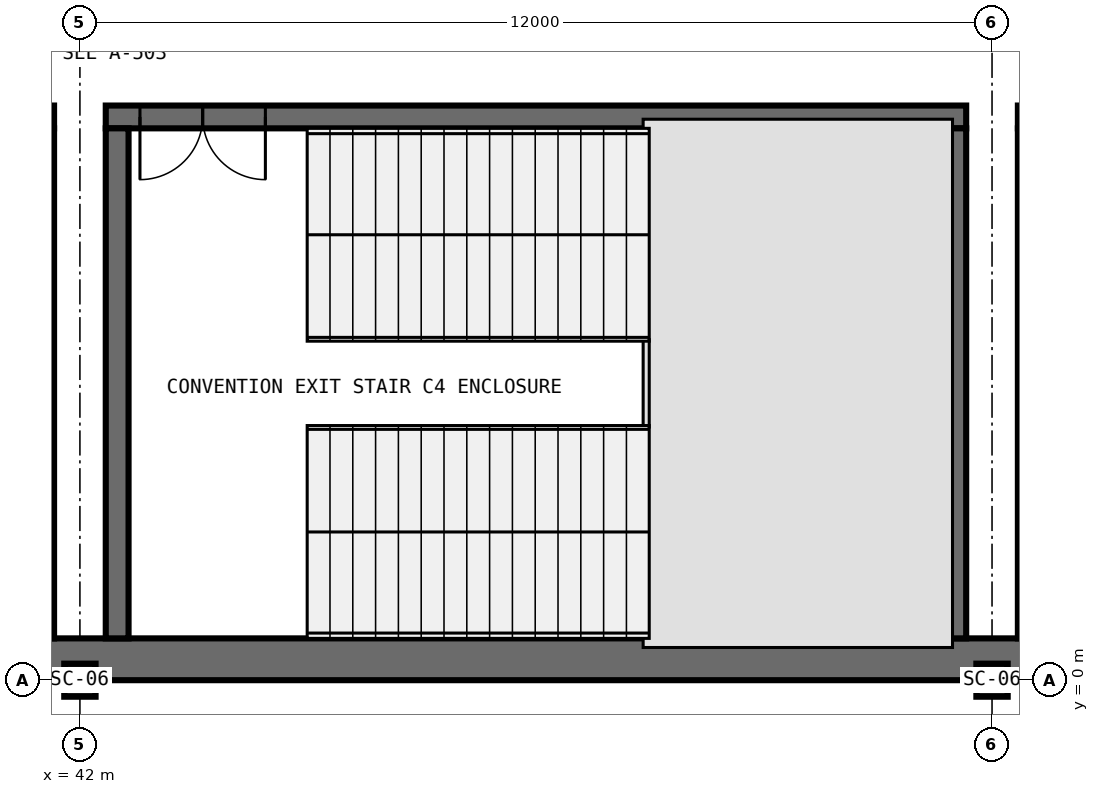
"""IFC4 building model, lengths in metres.
Left out: names, types, materials, properties, quantities, classifications, styles, units other than length and angle.
Written with IfcOpenShell. Run it as: python <this file> out.ifc"""

import sys

from ifc_helpers import new_model, si_unit, direction, frame, frame_2d, origin, origin_2d, place, context, subcontext, project, spatial, rectangle, i_section, extrude, element, fill, save


model = new_model("IFC4")
c1 = context("Model", 3, precision=1e-05, world=origin(), true_north=direction((0.0, 1.0)))
c2 = subcontext(c1, "Body", "Model", "MODEL_VIEW")
j1 = project(units=[si_unit("LENGTHUNIT", "METRE"), si_unit("PLANEANGLEUNIT", "RADIAN")], contexts=[c1])
p1 = place(None, origin())
s1 = spatial("IfcSite", under=j1, at=p1, CompositionType="ELEMENT")
p2 = place(p1, origin())
s2 = spatial("IfcBuilding", under=s1, at=p2, CompositionType="ELEMENT")
p3 = place(p2, frame((0.0, 0.0, -5.4)))
s3 = spatial("IfcBuildingStorey", under=s2, at=p3, CompositionType="ELEMENT", Elevation=-5.4)
for number, where, z_axis, x_axis in (
    (1, (42.0, 0.0, 0.0), (0.0, 0.0, 1.0), (1.0, 0.0, 0.0)),
    (2, (54.0, 0.0, 0.0), (0.0, 0.0, 1.0), (1.0, 0.0, 0.0)),
):
    element("IfcColumn", number, at=place(p3, frame(where, z_axis=z_axis, x_axis=x_axis)), inside=s3, PredefinedType="COLUMN", context=c2, shape_type="SweptSolid", body=[
        extrude(i_section(OverallWidth=0.412, OverallDepth=0.435, WebThickness=0.036, FlangeThickness=0.057, FilletRadius=0.031, at=origin_2d()), origin(), (0.0, 0.0, 1.0), 5.4),
    ])
p4 = place(p3, frame((0.0, 0.275, 0.0), z_axis=(0.0, 0.0, 1.0), x_axis=(1.0, 0.0, 0.0)))
e3 = element("IfcWall", 3, at=p4, inside=s3, PredefinedType="SOLIDWALL", context=c2, shape_type="SweptSolid", body=[
    extrude(rectangle(XDim=174.0, YDim=0.55, at=frame_2d((87.0, 0.0))), origin(), (0.0, 0.0, 1.0), 5.02),
])
p5 = place(p3, frame((41.66, 7.41, 0.0), z_axis=(0.0, 0.0, 1.0), x_axis=(-1.0, 0.0, 0.0)))
e4 = element("IfcWall", 4, at=p5, inside=s3, PredefinedType="SHEAR", context=c2, shape_type="SweptSolid", body=[
    extrude(rectangle(XDim=11.32, YDim=0.3, at=frame_2d((5.66, 0.0))), origin(), (0.0, 0.0, 1.0), 5.4),
])
p6 = place(p5, frame((9.22, 0.0, 0.0)))
e5 = element("IfcOpeningElement", 5, at=p6, cuts=e4, PredefinedType="OPENING", context=c2, shape_type="SweptSolid", body=[
    extrude(rectangle(XDim=1.65, YDim=2.25, at=frame_2d((0.825, 1.125))), frame((0.0, 0.165, 0.0), z_axis=(0.0, -1.0, 0.0), x_axis=(1.0, 0.0, 0.0)), (0.0, 0.0, 1.0), 0.33),
])
p7 = place(p3, frame((41.51, 0.55, 0.0), z_axis=(0.0, 0.0, 1.0), x_axis=(0.0, 1.0, 0.0)))
e6 = element("IfcWall", 6, at=p7, inside=s3, PredefinedType="SHEAR", context=c2, shape_type="SweptSolid", body=[
    extrude(rectangle(XDim=6.71, YDim=0.3, at=frame_2d((3.355, 0.0))), origin(), (0.0, 0.0, 1.0), 5.4),
])
p8 = place(p3, frame((53.66, 7.41, 0.0), z_axis=(0.0, 0.0, 1.0), x_axis=(-1.0, 0.0, 0.0)))
e7 = element("IfcWall", 7, at=p8, inside=s3, PredefinedType="SHEAR", context=c2, shape_type="SweptSolid", body=[
    extrude(rectangle(XDim=11.32, YDim=0.3, at=frame_2d((5.66, 0.0))), origin(), (0.0, 0.0, 1.0), 5.4),
])
p9 = place(p8, frame((9.22, 0.0, 0.0)))
e8 = element("IfcOpeningElement", 8, at=p9, cuts=e7, PredefinedType="OPENING", context=c2, shape_type="SweptSolid", body=[
    extrude(rectangle(XDim=1.65, YDim=2.25, at=frame_2d((0.825, 1.125))), frame((0.0, 0.165, 0.0), z_axis=(0.0, -1.0, 0.0), x_axis=(1.0, 0.0, 0.0)), (0.0, 0.0, 1.0), 0.33),
])
for number, where, z_axis, x_axis in (
    (9, (42.49, 7.26, 0.0), (0.0, 0.0, 1.0), (0.0, -1.0, 0.0)),
    (10, (53.51, 0.55, 0.0), (0.0, 0.0, 1.0), (0.0, 1.0, 0.0)),
):
    element("IfcWall", number, at=place(p3, frame(where, z_axis=z_axis, x_axis=x_axis)), inside=s3, PredefinedType="SHEAR", context=c2, shape_type="SweptSolid", body=[
        extrude(rectangle(XDim=6.71, YDim=0.3, at=frame_2d((3.355, 0.0))), origin(), (0.0, 0.0, 1.0), 5.4),
    ])
p10 = place(p3, frame((65.66, 7.41, 0.0), z_axis=(0.0, 0.0, 1.0), x_axis=(-1.0, 0.0, 0.0)))
e11 = element("IfcWall", 11, at=p10, inside=s3, PredefinedType="SHEAR", context=c2, shape_type="SweptSolid", body=[
    extrude(rectangle(XDim=11.32, YDim=0.3, at=frame_2d((5.66, 0.0))), origin(), (0.0, 0.0, 1.0), 5.4),
])
p11 = place(p10, frame((9.22, 0.0, 0.0)))
e12 = element("IfcOpeningElement", 12, at=p11, cuts=e11, PredefinedType="OPENING", context=c2, shape_type="SweptSolid", body=[
    extrude(rectangle(XDim=1.65, YDim=2.25, at=frame_2d((0.825, 1.125))), frame((0.0, 0.165, 0.0), z_axis=(0.0, -1.0, 0.0), x_axis=(1.0, 0.0, 0.0)), (0.0, 0.0, 1.0), 0.33),
])
p12 = place(p3, frame((54.49, 7.26, 0.0), z_axis=(0.0, 0.0, 1.0), x_axis=(0.0, -1.0, 0.0)))
e13 = element("IfcWall", 13, at=p12, inside=s3, PredefinedType="SHEAR", context=c2, shape_type="SweptSolid", body=[
    extrude(rectangle(XDim=6.71, YDim=0.3, at=frame_2d((3.355, 0.0))), origin(), (0.0, 0.0, 1.0), 5.4),
])
p13 = place(p9, origin())
e14 = element("IfcDoor", 14, at=p13, inside=s3, OperationType="DOUBLE_DOOR_SINGLE_SWING", PredefinedType="DOOR", context=c2, shape_type="SweptSolid", body=[
    extrude(rectangle(XDim=1.65, YDim=2.25, at=frame_2d((0.825, 1.125))), frame((0.0, 0.025, 0.0), z_axis=(0.0, -1.0, 0.0), x_axis=(1.0, 0.0, 0.0)), (0.0, 0.0, 1.0), 0.05),
])
fill(e8, e14)
save(model, sys.argv[1])
